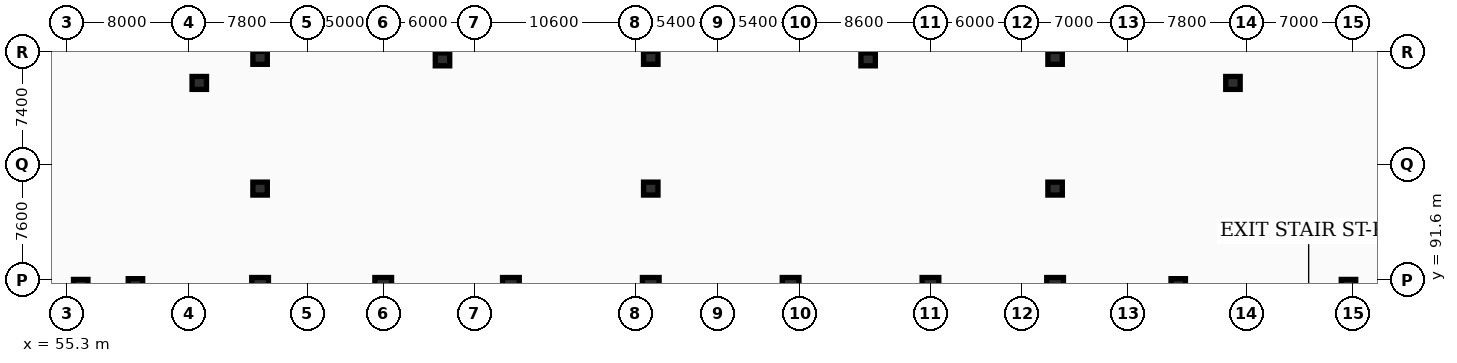
"""IFC4 building model, lengths in metres.
Left out: names, types, materials, properties, quantities, classifications, styles, units other than length and angle.
Written with IfcOpenShell. Run it as: python <this file> out.ifc"""

import sys

from ifc_helpers import new_model, si_unit, direction, frame, origin, origin_2d, place, context, subcontext, project, spatial, rectangle, circle, extrude, element, save


model = new_model("IFC4")
c1 = context("Model", 3, precision=1e-05, world=origin(), true_north=direction((0.0, 1.0)))
c2 = subcontext(c1, "Body", "Model", "MODEL_VIEW")
j1 = project(units=[si_unit("LENGTHUNIT", "METRE"), si_unit("PLANEANGLEUNIT", "RADIAN")], contexts=[c1])
p1 = place(None, origin())
s1 = spatial("IfcSite", under=j1, at=p1, CompositionType="ELEMENT")
p2 = place(p1, origin())
s2 = spatial("IfcBuilding", under=s1, at=p2, CompositionType="ELEMENT")
p3 = place(p2, frame((0.0, 0.0, -3.6)))
s3 = spatial("IfcBuildingStorey", under=s2, at=p3, CompositionType="ELEMENT", Elevation=-3.6)
p4 = place(p3, frame((59.8, 91.2, 0.0), z_axis=(0.0, 0.0, 1.0), x_axis=(1.0, 0.0, 0.0)))
e1 = element("IfcColumn", 1, at=p4, inside=s3, PredefinedType="COLUMN", context=c2, shape_type="SweptSolid", body=[
    extrude(circle(Radius=0.475, at=origin_2d()), origin(), (0.0, 0.0, 1.0), 3.6),
])
for number, where, z_axis, x_axis in (
    (2, (68.0, 91.2, 0.0), (0.0, 0.0, 1.0), (1.0, 0.0, 0.0)),
    (3, (76.1, 91.2, 0.0), (0.0, 0.0, 1.0), (1.0, 0.0, 0.0)),
    (4, (84.5, 91.2, 0.0), (0.0, 0.0, 1.0), (1.0, 0.0, 0.0)),
    (5, (93.7, 91.2, 0.0), (0.0, 0.0, 1.0), (1.0, 0.0, 0.0)),
    (6, (102.9, 91.2, 0.0), (0.0, 0.0, 1.0), (1.0, 0.0, 0.0)),
    (7, (112.1, 91.2, 0.0), (0.0, 0.0, 1.0), (1.0, 0.0, 0.0)),
    (8, (120.3, 91.2, 0.0), (0.0, 0.0, 1.0), (1.0, 0.0, 0.0)),
):
    element("IfcColumn", number, at=place(p3, frame(where, z_axis=z_axis, x_axis=x_axis)), inside=s3, PredefinedType="COLUMN", context=c2, shape_type="SweptSolid", body=[
        extrude(rectangle(XDim=1.1, YDim=1.1, at=origin_2d()), origin(), (0.0, 0.0, 1.0), 3.6),
    ])
p5 = place(p3, frame((128.4, 91.2, 0.0), z_axis=(0.0, 0.0, 1.0), x_axis=(1.0, 0.0, 0.0)))
e9 = element("IfcColumn", 9, at=p5, inside=s3, PredefinedType="COLUMN", context=c2, shape_type="SweptSolid", body=[
    extrude(circle(Radius=0.475, at=origin_2d()), origin(), (0.0, 0.0, 1.0), 3.6),
])
for number, where, z_axis, x_axis in (
    (10, (56.2, 91.2, 0.0), (0.0, 0.0, 1.0), (1.0, 0.0, 0.0)),
    (11, (139.6, 91.2, 0.0), (0.0, 0.0, 1.0), (1.0, 0.0, 0.0)),
    (12, (68.0, 97.6, 0.0), (0.0, 0.0, 1.0), (1.0, 0.0, 0.0)),
    (13, (93.7, 97.6, 0.0), (0.0, 0.0, 1.0), (1.0, 0.0, 0.0)),
    (14, (120.3, 97.6, 0.0), (0.0, 0.0, 1.0), (1.0, 0.0, 0.0)),
    (15, (80.0, 106.1, 0.0), (0.0, 0.0, 1.0), (1.0, 0.0, 0.0)),
    (16, (108.0, 106.1, 0.0), (0.0, 0.0, 1.0), (1.0, 0.0, 0.0)),
    (17, (64.0, 104.55, 0.0), (0.0, 0.0, 1.0), (1.0, 0.0, 0.0)),
    (18, (132.0, 104.55, 0.0), (0.0, 0.0, 1.0), (1.0, 0.0, 0.0)),
    (19, (68.0, 106.2, 0.0), (0.0, 0.0, 1.0), (1.0, 0.0, 0.0)),
    (20, (93.7, 106.2, 0.0), (0.0, 0.0, 1.0), (1.0, 0.0, 0.0)),
    (21, (120.3, 106.2, 0.0), (0.0, 0.0, 1.0), (1.0, 0.0, 0.0)),
):
    element("IfcColumn", number, at=place(p3, frame(where, z_axis=z_axis, x_axis=x_axis)), inside=s3, PredefinedType="COLUMN", context=c2, shape_type="SweptSolid", body=[
        extrude(rectangle(XDim=0.95, YDim=0.85, at=origin_2d()), origin(), (0.0, 0.0, 1.0), 3.6),
    ])
save(model, sys.argv[1])
